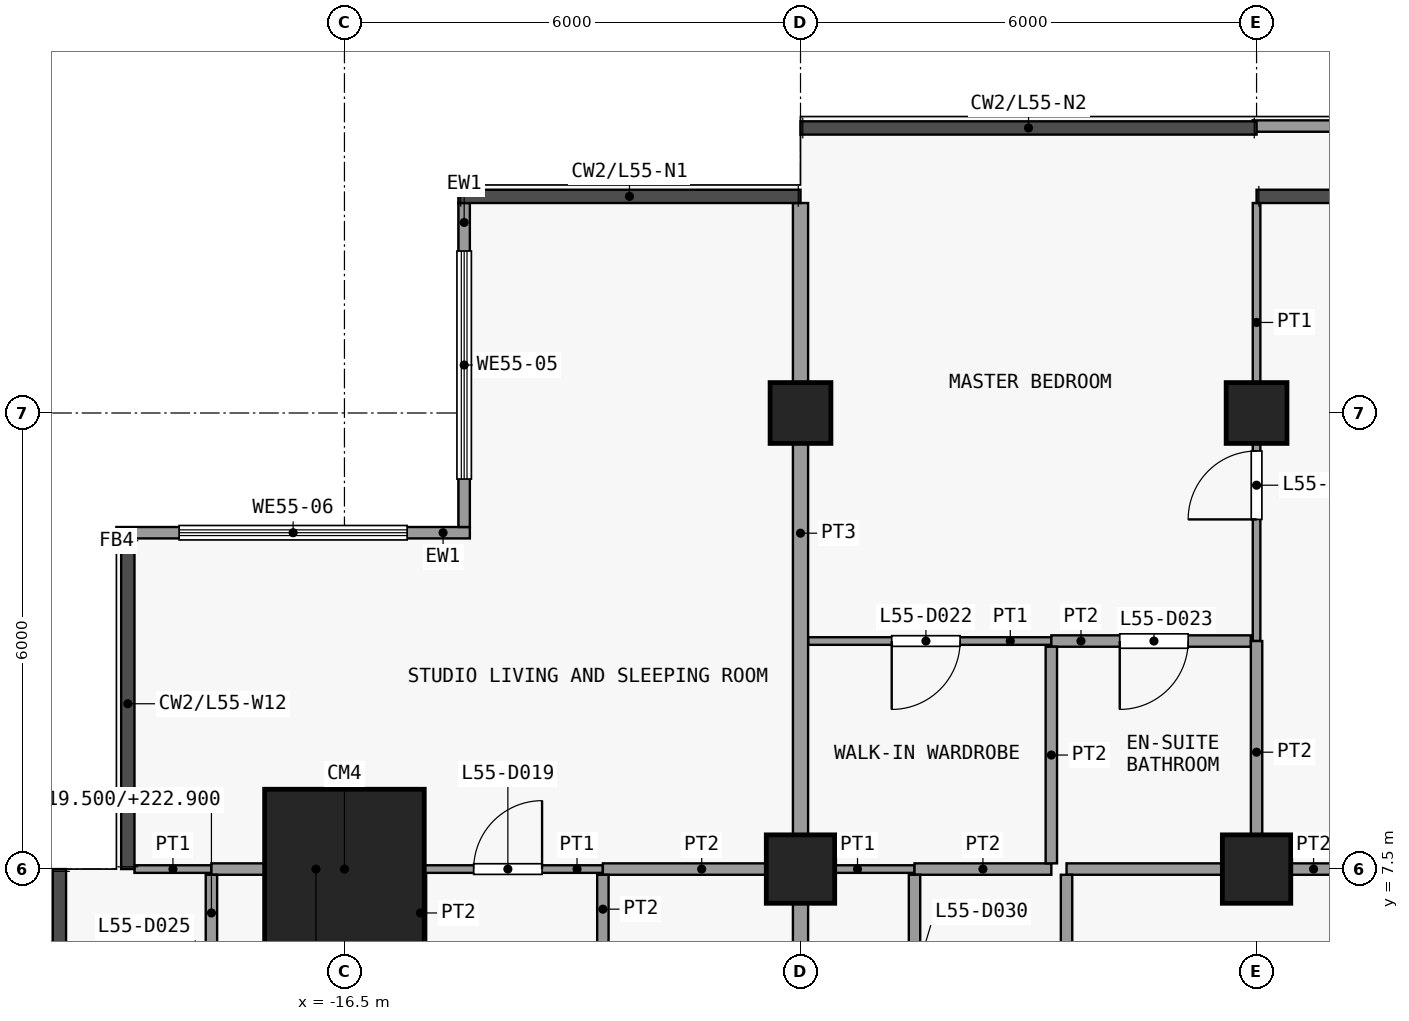
"""IFC4 building model, lengths in metres.
Left out: names, types, materials, properties, quantities, classifications, styles, units other than length and angle.
Written with IfcOpenShell. Run it as: python <this file> out.ifc"""

import sys

from ifc_helpers import new_model, si_unit, direction, frame, frame_2d, origin, origin_2d, place, context, subcontext, project, spatial, rectangle, extrude, element, fill, save


model = new_model("IFC4")
c1 = context("Model", 3, precision=1e-05, world=origin(), true_north=direction((0.0, 1.0)))
c2 = subcontext(c1, "Body", "Model", "MODEL_VIEW")
j1 = project(units=[si_unit("LENGTHUNIT", "METRE"), si_unit("PLANEANGLEUNIT", "RADIAN")], contexts=[c1])
p1 = place(None, origin())
s1 = spatial("IfcSite", under=j1, at=p1, CompositionType="ELEMENT")
p2 = place(p1, origin())
s2 = spatial("IfcBuilding", under=s1, at=p2, CompositionType="ELEMENT")
p3 = place(p2, frame((0.0, 0.0, 219.5)))
s3 = spatial("IfcBuildingStorey", under=s2, at=p3, CompositionType="ELEMENT", Elevation=219.5)
p4 = place(p3, frame((-16.5, 7.5, 0.0), z_axis=(0.0, 0.0, 1.0), x_axis=(1.0, 0.0, 0.0)))
e1 = element("IfcColumn", 1, at=p4, inside=s3, PredefinedType="COLUMN", context=c2, shape_type="SweptSolid", body=[
    extrude(rectangle(XDim=2.1, YDim=2.1, at=origin_2d()), origin(), (0.0, 0.0, 1.0), 3.6),
])
p5 = place(p3, frame((-10.5, 7.5, 0.0), z_axis=(0.0, 0.0, 1.0), x_axis=(1.0, 0.0, 0.0)))
e2 = element("IfcColumn", 2, at=p5, inside=s3, PredefinedType="COLUMN", context=c2, shape_type="SweptSolid", body=[
    extrude(rectangle(XDim=0.9, YDim=0.9, at=origin_2d()), origin(), (0.0, 0.0, 1.0), 3.6),
])
p6 = place(p3, frame((-10.5, 13.5, 0.0), z_axis=(0.0, 0.0, 1.0), x_axis=(1.0, 0.0, 0.0)))
e3 = element("IfcColumn", 3, at=p6, inside=s3, PredefinedType="COLUMN", context=c2, shape_type="SweptSolid", body=[
    extrude(rectangle(XDim=0.8, YDim=0.8, at=origin_2d()), origin(), (0.0, 0.0, 1.0), 3.6),
])
p7 = place(p3, frame((-4.5, 7.5, 0.0), z_axis=(0.0, 0.0, 1.0), x_axis=(1.0, 0.0, 0.0)))
e4 = element("IfcColumn", 4, at=p7, inside=s3, PredefinedType="COLUMN", context=c2, shape_type="SweptSolid", body=[
    extrude(rectangle(XDim=0.9, YDim=0.9, at=origin_2d()), origin(), (0.0, 0.0, 1.0), 3.6),
])
p8 = place(p3, frame((-4.5, 13.5, 0.0), z_axis=(0.0, 0.0, 1.0), x_axis=(1.0, 0.0, 0.0)))
e5 = element("IfcColumn", 5, at=p8, inside=s3, PredefinedType="COLUMN", context=c2, shape_type="SweptSolid", body=[
    extrude(rectangle(XDim=0.8, YDim=0.8, at=origin_2d()), origin(), (0.0, 0.0, 1.0), 3.6),
])
p9 = place(p3, frame((-14.925, 12.0, 0.0), z_axis=(0.0, 0.0, 1.0), x_axis=(0.0, 1.0, 0.0)))
e6 = element("IfcWall", 6, at=p9, inside=s3, PredefinedType="SOLIDWALL", context=c2, shape_type="SweptSolid", body=[
    extrude(rectangle(XDim=4.262, YDim=0.15, at=frame_2d((2.131, 0.0))), origin(), (0.0, 0.0, 1.0), 3.3),
])
p10 = place(p9, frame((0.631, 0.0, 0.9)))
e7 = element("IfcOpeningElement", 7, at=p10, cuts=e6, PredefinedType="OPENING", context=c2, shape_type="SweptSolid", body=[
    extrude(rectangle(XDim=3.0, YDim=2.4, at=frame_2d((1.5, 1.2))), frame((0.0, 0.085, 0.0), z_axis=(0.0, -1.0, 0.0), x_axis=(1.0, 0.0, 0.0)), (0.0, 0.0, 1.0), 0.17),
])
p11 = place(p3, frame((-19.5, 11.925, 0.0), z_axis=(0.0, 0.0, 1.0), x_axis=(1.0, 0.0, 0.0)))
e8 = element("IfcWall", 8, at=p11, inside=s3, PredefinedType="SOLIDWALL", context=c2, shape_type="SweptSolid", body=[
    extrude(rectangle(XDim=4.65, YDim=0.15, at=frame_2d((2.325, 0.0))), origin(), (0.0, 0.0, 1.0), 3.3),
])
p12 = place(p11, frame((0.825, 0.0, 0.9)))
e9 = element("IfcOpeningElement", 9, at=p12, cuts=e8, PredefinedType="OPENING", context=c2, shape_type="SweptSolid", body=[
    extrude(rectangle(XDim=3.0, YDim=2.4, at=frame_2d((1.5, 1.2))), frame((0.0, 0.085, 0.0), z_axis=(0.0, -1.0, 0.0), x_axis=(1.0, 0.0, 0.0)), (0.0, 0.0, 1.0), 0.17),
])
p13 = place(p3, frame((-4.552, 17.275, 0.0), z_axis=(0.0, 0.0, 1.0), x_axis=(1.0, 0.0, 0.0)))
e10 = element("IfcWall", 10, at=p13, inside=s3, PredefinedType="PARAPET", context=c2, shape_type="SweptSolid", body=[
    extrude(rectangle(XDim=9.002, YDim=0.15, at=frame_2d((4.501, 0.0))), origin(), (0.0, 0.0, 1.0), 1.15),
])
p14 = place(p3, frame((-19.262, 7.5, 0.0), z_axis=(0.0, 0.0, 1.0), x_axis=(1.0, 0.0, 0.0)))
e11 = element("IfcWall", 11, at=p14, inside=s3, PredefinedType="PARTITIONING", context=c2, shape_type="SweptSolid", body=[
    extrude(rectangle(XDim=1.012, YDim=0.1, at=frame_2d((0.506, 0.0))), origin(), (0.0, 0.0, 1.0), 3.3),
])
p15 = place(p3, frame((-15.5, 7.5, 0.0), z_axis=(0.0, 0.0, 1.0), x_axis=(1.0, 0.0, 0.0)))
e12 = element("IfcWall", 12, at=p15, inside=s3, PredefinedType="PARTITIONING", context=c2, shape_type="SweptSolid", body=[
    extrude(rectangle(XDim=2.4, YDim=0.1, at=frame_2d((1.2, 0.0))), origin(), (0.0, 0.0, 1.0), 3.3),
])
p16 = place(p15, frame((0.7, 0.0, 0.0)))
e13 = element("IfcOpeningElement", 13, at=p16, cuts=e12, PredefinedType="OPENING", context=c2, shape_type="SweptSolid", body=[
    extrude(rectangle(XDim=0.9, YDim=2.1, at=frame_2d((0.45, 1.05))), frame((0.0, 0.06, 0.0), z_axis=(0.0, -1.0, 0.0), x_axis=(1.0, 0.0, 0.0)), (0.0, 0.0, 1.0), 0.12),
])
p17 = place(p3, frame((-10.5, 7.5, 0.0), z_axis=(0.0, 0.0, 1.0), x_axis=(1.0, 0.0, 0.0)))
e14 = element("IfcWall", 14, at=p17, inside=s3, PredefinedType="PARTITIONING", context=c2, shape_type="SweptSolid", body=[
    extrude(rectangle(XDim=1.5, YDim=0.1, at=frame_2d((0.75, 0.0))), origin(), (0.0, 0.0, 1.0), 3.3),
])
p18 = place(p3, frame((-18.25, 7.5, 0.0), z_axis=(0.0, 0.0, 1.0), x_axis=(1.0, 0.0, 0.0)))
e15 = element("IfcWall", 15, at=p18, inside=s3, PredefinedType="PARTITIONING", context=c2, shape_type="SweptSolid", body=[
    extrude(rectangle(XDim=2.75, YDim=0.15, at=frame_2d((1.375, 0.0))), origin(), (0.0, 0.0, 1.0), 3.3),
])
p19 = place(p3, frame((-13.1, 7.5, 0.0), z_axis=(0.0, 0.0, 1.0), x_axis=(1.0, 0.0, 0.0)))
e16 = element("IfcWall", 16, at=p19, inside=s3, PredefinedType="PARTITIONING", context=c2, shape_type="SweptSolid", body=[
    extrude(rectangle(XDim=2.6, YDim=0.15, at=frame_2d((1.3, 0.0))), origin(), (0.0, 0.0, 1.0), 3.3),
])
p20 = place(p3, frame((-9.0, 7.5, 0.0), z_axis=(0.0, 0.0, 1.0), x_axis=(1.0, 0.0, 0.0)))
e17 = element("IfcWall", 17, at=p20, inside=s3, PredefinedType="PARTITIONING", context=c2, shape_type="SweptSolid", body=[
    extrude(rectangle(XDim=1.8, YDim=0.15, at=frame_2d((0.9, 0.0))), origin(), (0.0, 0.0, 1.0), 3.3),
])
p21 = place(p3, frame((-7.0, 7.5, 0.0), z_axis=(0.0, 0.0, 1.0), x_axis=(1.0, 0.0, 0.0)))
e18 = element("IfcWall", 18, at=p21, inside=s3, PredefinedType="PARTITIONING", context=c2, shape_type="SweptSolid", body=[
    extrude(rectangle(XDim=6.5, YDim=0.15, at=frame_2d((3.25, 0.0))), origin(), (0.0, 0.0, 1.0), 3.3),
])
p22 = place(p3, frame((-10.4, 10.5, 0.0), z_axis=(0.0, 0.0, 1.0), x_axis=(1.0, 0.0, 0.0)))
e19 = element("IfcWall", 19, at=p22, inside=s3, PredefinedType="PARTITIONING", context=c2, shape_type="SweptSolid", body=[
    extrude(rectangle(XDim=3.2, YDim=0.1, at=frame_2d((1.6, 0.0))), origin(), (0.0, 0.0, 1.0), 3.3),
])
p23 = place(p22, frame((1.1, 0.0, 0.0)))
e20 = element("IfcOpeningElement", 20, at=p23, cuts=e19, PredefinedType="OPENING", context=c2, shape_type="SweptSolid", body=[
    extrude(rectangle(XDim=0.9, YDim=2.1, at=frame_2d((0.45, 1.05))), frame((0.0, 0.06, 0.0), z_axis=(0.0, -1.0, 0.0), x_axis=(1.0, 0.0, 0.0)), (0.0, 0.0, 1.0), 0.12),
])
p24 = place(p3, frame((-7.2, 10.5, 0.0), z_axis=(0.0, 0.0, 1.0), x_axis=(1.0, 0.0, 0.0)))
e21 = element("IfcWall", 21, at=p24, inside=s3, PredefinedType="PARTITIONING", context=c2, shape_type="SweptSolid", body=[
    extrude(rectangle(XDim=2.625, YDim=0.15, at=frame_2d((1.312, 0.0))), origin(), (0.0, 0.0, 1.0), 3.3),
])
p25 = place(p24, frame((0.9, 0.0, 0.0)))
e22 = element("IfcOpeningElement", 22, at=p25, cuts=e21, PredefinedType="OPENING", context=c2, shape_type="SweptSolid", body=[
    extrude(rectangle(XDim=0.9, YDim=2.1, at=frame_2d((0.45, 1.05))), frame((0.0, 0.085, 0.0), z_axis=(0.0, -1.0, 0.0), x_axis=(1.0, 0.0, 0.0)), (0.0, 0.0, 1.0), 0.17),
])
p26 = place(p3, frame((-18.25, 4.6, 0.0), z_axis=(0.0, 0.0, 1.0), x_axis=(0.0, 1.0, 0.0)))
e23 = element("IfcWall", 23, at=p26, inside=s3, PredefinedType="PARTITIONING", context=c2, shape_type="SweptSolid", body=[
    extrude(rectangle(XDim=2.825, YDim=0.15, at=frame_2d((1.413, 0.0))), origin(), (0.0, 0.0, 1.0), 3.4),
])
p27 = place(p26, frame((0.8, 0.0, 0.0)))
e24 = element("IfcOpeningElement", 24, at=p27, cuts=e23, PredefinedType="OPENING", context=c2, shape_type="SweptSolid", body=[
    extrude(rectangle(XDim=0.9, YDim=2.1, at=frame_2d((0.45, 1.05))), frame((0.0, 0.085, 0.0), z_axis=(0.0, -1.0, 0.0), x_axis=(1.0, 0.0, 0.0)), (0.0, 0.0, 1.0), 0.17),
])
p28 = place(p3, frame((-15.5, 4.6, 0.0), z_axis=(0.0, 0.0, 1.0), x_axis=(0.0, 1.0, 0.0)))
e25 = element("IfcWall", 25, at=p28, inside=s3, PredefinedType="PARTITIONING", context=c2, shape_type="SweptSolid", body=[
    extrude(rectangle(XDim=2.825, YDim=0.15, at=frame_2d((1.413, 0.0))), origin(), (0.0, 0.0, 1.0), 3.3),
])
p29 = place(p28, frame((0.8, 0.0, 0.0)))
e26 = element("IfcOpeningElement", 26, at=p29, cuts=e25, PredefinedType="OPENING", context=c2, shape_type="SweptSolid", body=[
    extrude(rectangle(XDim=0.9, YDim=2.1, at=frame_2d((0.45, 1.05))), frame((0.0, 0.085, 0.0), z_axis=(0.0, -1.0, 0.0), x_axis=(1.0, 0.0, 0.0)), (0.0, 0.0, 1.0), 0.17),
])
p30 = place(p3, frame((-13.1, 4.6, 0.0), z_axis=(0.0, 0.0, 1.0), x_axis=(0.0, 1.0, 0.0)))
e27 = element("IfcWall", 27, at=p30, inside=s3, PredefinedType="PARTITIONING", context=c2, shape_type="SweptSolid", body=[
    extrude(rectangle(XDim=2.825, YDim=0.15, at=frame_2d((1.413, 0.0))), origin(), (0.0, 0.0, 1.0), 3.3),
])
p31 = place(p30, frame((0.9, 0.0, 0.0)))
e28 = element("IfcOpeningElement", 28, at=p31, cuts=e27, PredefinedType="OPENING", context=c2, shape_type="SweptSolid", body=[
    extrude(rectangle(XDim=0.9, YDim=2.1, at=frame_2d((0.45, 1.05))), frame((0.0, 0.085, 0.0), z_axis=(0.0, -1.0, 0.0), x_axis=(1.0, 0.0, 0.0)), (0.0, 0.0, 1.0), 0.17),
])
p32 = place(p3, frame((-10.5, 4.6, 0.0), z_axis=(0.0, 0.0, 1.0), x_axis=(0.0, 1.0, 0.0)))
e29 = element("IfcWall", 29, at=p32, inside=s3, PredefinedType="PARTITIONING", context=c2, shape_type="SweptSolid", body=[
    extrude(rectangle(XDim=2.825, YDim=0.2, at=frame_2d((1.413, 0.0))), origin(), (0.0, 0.0, 1.0), 3.3),
])
p33 = place(p3, frame((-10.5, 7.575, 0.0), z_axis=(0.0, 0.0, 1.0), x_axis=(0.0, 1.0, 0.0)))
e30 = element("IfcWall", 30, at=p33, inside=s3, PredefinedType="PARTITIONING", context=c2, shape_type="SweptSolid", body=[
    extrude(rectangle(XDim=8.688, YDim=0.2, at=frame_2d((4.344, 0.0))), origin(), (0.0, 0.0, 1.0), 3.3),
])
p34 = place(p3, frame((-9.0, 4.6, 0.0), z_axis=(0.0, 0.0, 1.0), x_axis=(0.0, 1.0, 0.0)))
e31 = element("IfcWall", 31, at=p34, inside=s3, PredefinedType="PARTITIONING", context=c2, shape_type="SweptSolid", body=[
    extrude(rectangle(XDim=2.825, YDim=0.15, at=frame_2d((1.413, 0.0))), origin(), (0.0, 0.0, 1.0), 3.3),
])
p35 = place(p34, frame((1.0, 0.0, 0.0)))
e32 = element("IfcOpeningElement", 32, at=p35, cuts=e31, PredefinedType="OPENING", context=c2, shape_type="SweptSolid", body=[
    extrude(rectangle(XDim=0.9, YDim=2.1, at=frame_2d((0.45, 1.05))), frame((0.0, 0.085, 0.0), z_axis=(0.0, -1.0, 0.0), x_axis=(1.0, 0.0, 0.0)), (0.0, 0.0, 1.0), 0.17),
])
p36 = place(p3, frame((-7.2, 7.575, 0.0), z_axis=(0.0, 0.0, 1.0), x_axis=(0.0, 1.0, 0.0)))
e33 = element("IfcWall", 33, at=p36, inside=s3, PredefinedType="PARTITIONING", context=c2, shape_type="SweptSolid", body=[
    extrude(rectangle(XDim=2.85, YDim=0.15, at=frame_2d((1.425, 0.0))), origin(), (0.0, 0.0, 1.0), 3.3),
])
p37 = place(p3, frame((-7.0, 4.6, 0.0), z_axis=(0.0, 0.0, 1.0), x_axis=(0.0, 1.0, 0.0)))
e34 = element("IfcWall", 34, at=p37, inside=s3, PredefinedType="PARTITIONING", context=c2, shape_type="SweptSolid", body=[
    extrude(rectangle(XDim=2.825, YDim=0.15, at=frame_2d((1.413, 0.0))), origin(), (0.0, 0.0, 1.0), 3.3),
])
p38 = place(p37, frame((1.0, 0.0, 0.0)))
e35 = element("IfcOpeningElement", 35, at=p38, cuts=e34, PredefinedType="OPENING", context=c2, shape_type="SweptSolid", body=[
    extrude(rectangle(XDim=0.9, YDim=2.1, at=frame_2d((0.45, 1.05))), frame((0.0, 0.085, 0.0), z_axis=(0.0, -1.0, 0.0), x_axis=(1.0, 0.0, 0.0)), (0.0, 0.0, 1.0), 0.17),
])
p39 = place(p3, frame((-4.5, 10.5, 0.0), z_axis=(0.0, 0.0, 1.0), x_axis=(0.0, 1.0, 0.0)))
e36 = element("IfcWall", 36, at=p39, inside=s3, PredefinedType="PARTITIONING", context=c2, shape_type="SweptSolid", body=[
    extrude(rectangle(XDim=5.762, YDim=0.1, at=frame_2d((2.881, 0.0))), origin(), (0.0, 0.0, 1.0), 3.3),
])
p40 = place(p39, frame((1.6, 0.0, 0.0)))
e37 = element("IfcOpeningElement", 37, at=p40, cuts=e36, PredefinedType="OPENING", context=c2, shape_type="SweptSolid", body=[
    extrude(rectangle(XDim=0.9, YDim=2.1, at=frame_2d((0.45, 1.05))), frame((0.0, 0.06, 0.0), z_axis=(0.0, -1.0, 0.0), x_axis=(1.0, 0.0, 0.0)), (0.0, 0.0, 1.0), 0.12),
])
p41 = place(p3, frame((-4.5, 7.575, 0.0), z_axis=(0.0, 0.0, 1.0), x_axis=(0.0, 1.0, 0.0)))
e38 = element("IfcWall", 38, at=p41, inside=s3, PredefinedType="PARTITIONING", context=c2, shape_type="SweptSolid", body=[
    extrude(rectangle(XDim=2.925, YDim=0.15, at=frame_2d((1.462, 0.0))), origin(), (0.0, 0.0, 1.0), 3.3),
])
p42 = place(p10, origin())
e39 = element("IfcWindow", 39, at=p42, inside=s3, PartitioningType="SINGLE_PANEL", PredefinedType="WINDOW", context=c2, shape_type="SweptSolid", body=[
    extrude(rectangle(XDim=3.0, YDim=2.4, at=frame_2d((1.5, 1.2))), frame((0.0, 0.03, 0.0), z_axis=(0.0, -1.0, 0.0), x_axis=(1.0, 0.0, 0.0)), (0.0, 0.0, 1.0), 0.06),
])
fill(e7, e39)
p43 = place(p12, origin())
e40 = element("IfcWindow", 40, at=p43, inside=s3, PartitioningType="SINGLE_PANEL", PredefinedType="WINDOW", context=c2, shape_type="SweptSolid", body=[
    extrude(rectangle(XDim=3.0, YDim=2.4, at=frame_2d((1.5, 1.2))), frame((0.0, 0.03, 0.0), z_axis=(0.0, -1.0, 0.0), x_axis=(1.0, 0.0, 0.0)), (0.0, 0.0, 1.0), 0.06),
])
fill(e9, e40)
p44 = place(p16, origin())
e41 = element("IfcDoor", 41, at=p44, inside=s3, OperationType="SINGLE_SWING_LEFT", PredefinedType="DOOR", context=c2, shape_type="SweptSolid", body=[
    extrude(rectangle(XDim=0.9, YDim=2.1, at=frame_2d((0.45, 1.05))), frame((0.0, 0.025, 0.0), z_axis=(0.0, -1.0, 0.0), x_axis=(1.0, 0.0, 0.0)), (0.0, 0.0, 1.0), 0.05),
])
fill(e13, e41)
p45 = place(p23, origin())
e42 = element("IfcDoor", 42, at=p45, inside=s3, OperationType="SINGLE_SWING_LEFT", PredefinedType="DOOR", context=c2, shape_type="SweptSolid", body=[
    extrude(rectangle(XDim=0.9, YDim=2.1, at=frame_2d((0.45, 1.05))), frame((0.0, 0.025, 0.0), z_axis=(0.0, -1.0, 0.0), x_axis=(1.0, 0.0, 0.0)), (0.0, 0.0, 1.0), 0.05),
])
fill(e20, e42)
p46 = place(p25, origin())
e43 = element("IfcDoor", 43, at=p46, inside=s3, OperationType="SINGLE_SWING_LEFT", PredefinedType="DOOR", context=c2, shape_type="SweptSolid", body=[
    extrude(rectangle(XDim=0.9, YDim=2.1, at=frame_2d((0.45, 1.05))), frame((0.0, 0.025, 0.0), z_axis=(0.0, -1.0, 0.0), x_axis=(1.0, 0.0, 0.0)), (0.0, 0.0, 1.0), 0.05),
])
fill(e22, e43)
p47 = place(p40, origin())
e44 = element("IfcDoor", 44, at=p47, inside=s3, OperationType="SINGLE_SWING_RIGHT", PredefinedType="DOOR", context=c2, shape_type="SweptSolid", body=[
    extrude(rectangle(XDim=0.9, YDim=2.1, at=frame_2d((0.45, 1.05))), frame((0.0, 0.025, 0.0), z_axis=(0.0, -1.0, 0.0), x_axis=(1.0, 0.0, 0.0)), (0.0, 0.0, 1.0), 0.05),
])
fill(e37, e44)
save(model, sys.argv[1])
